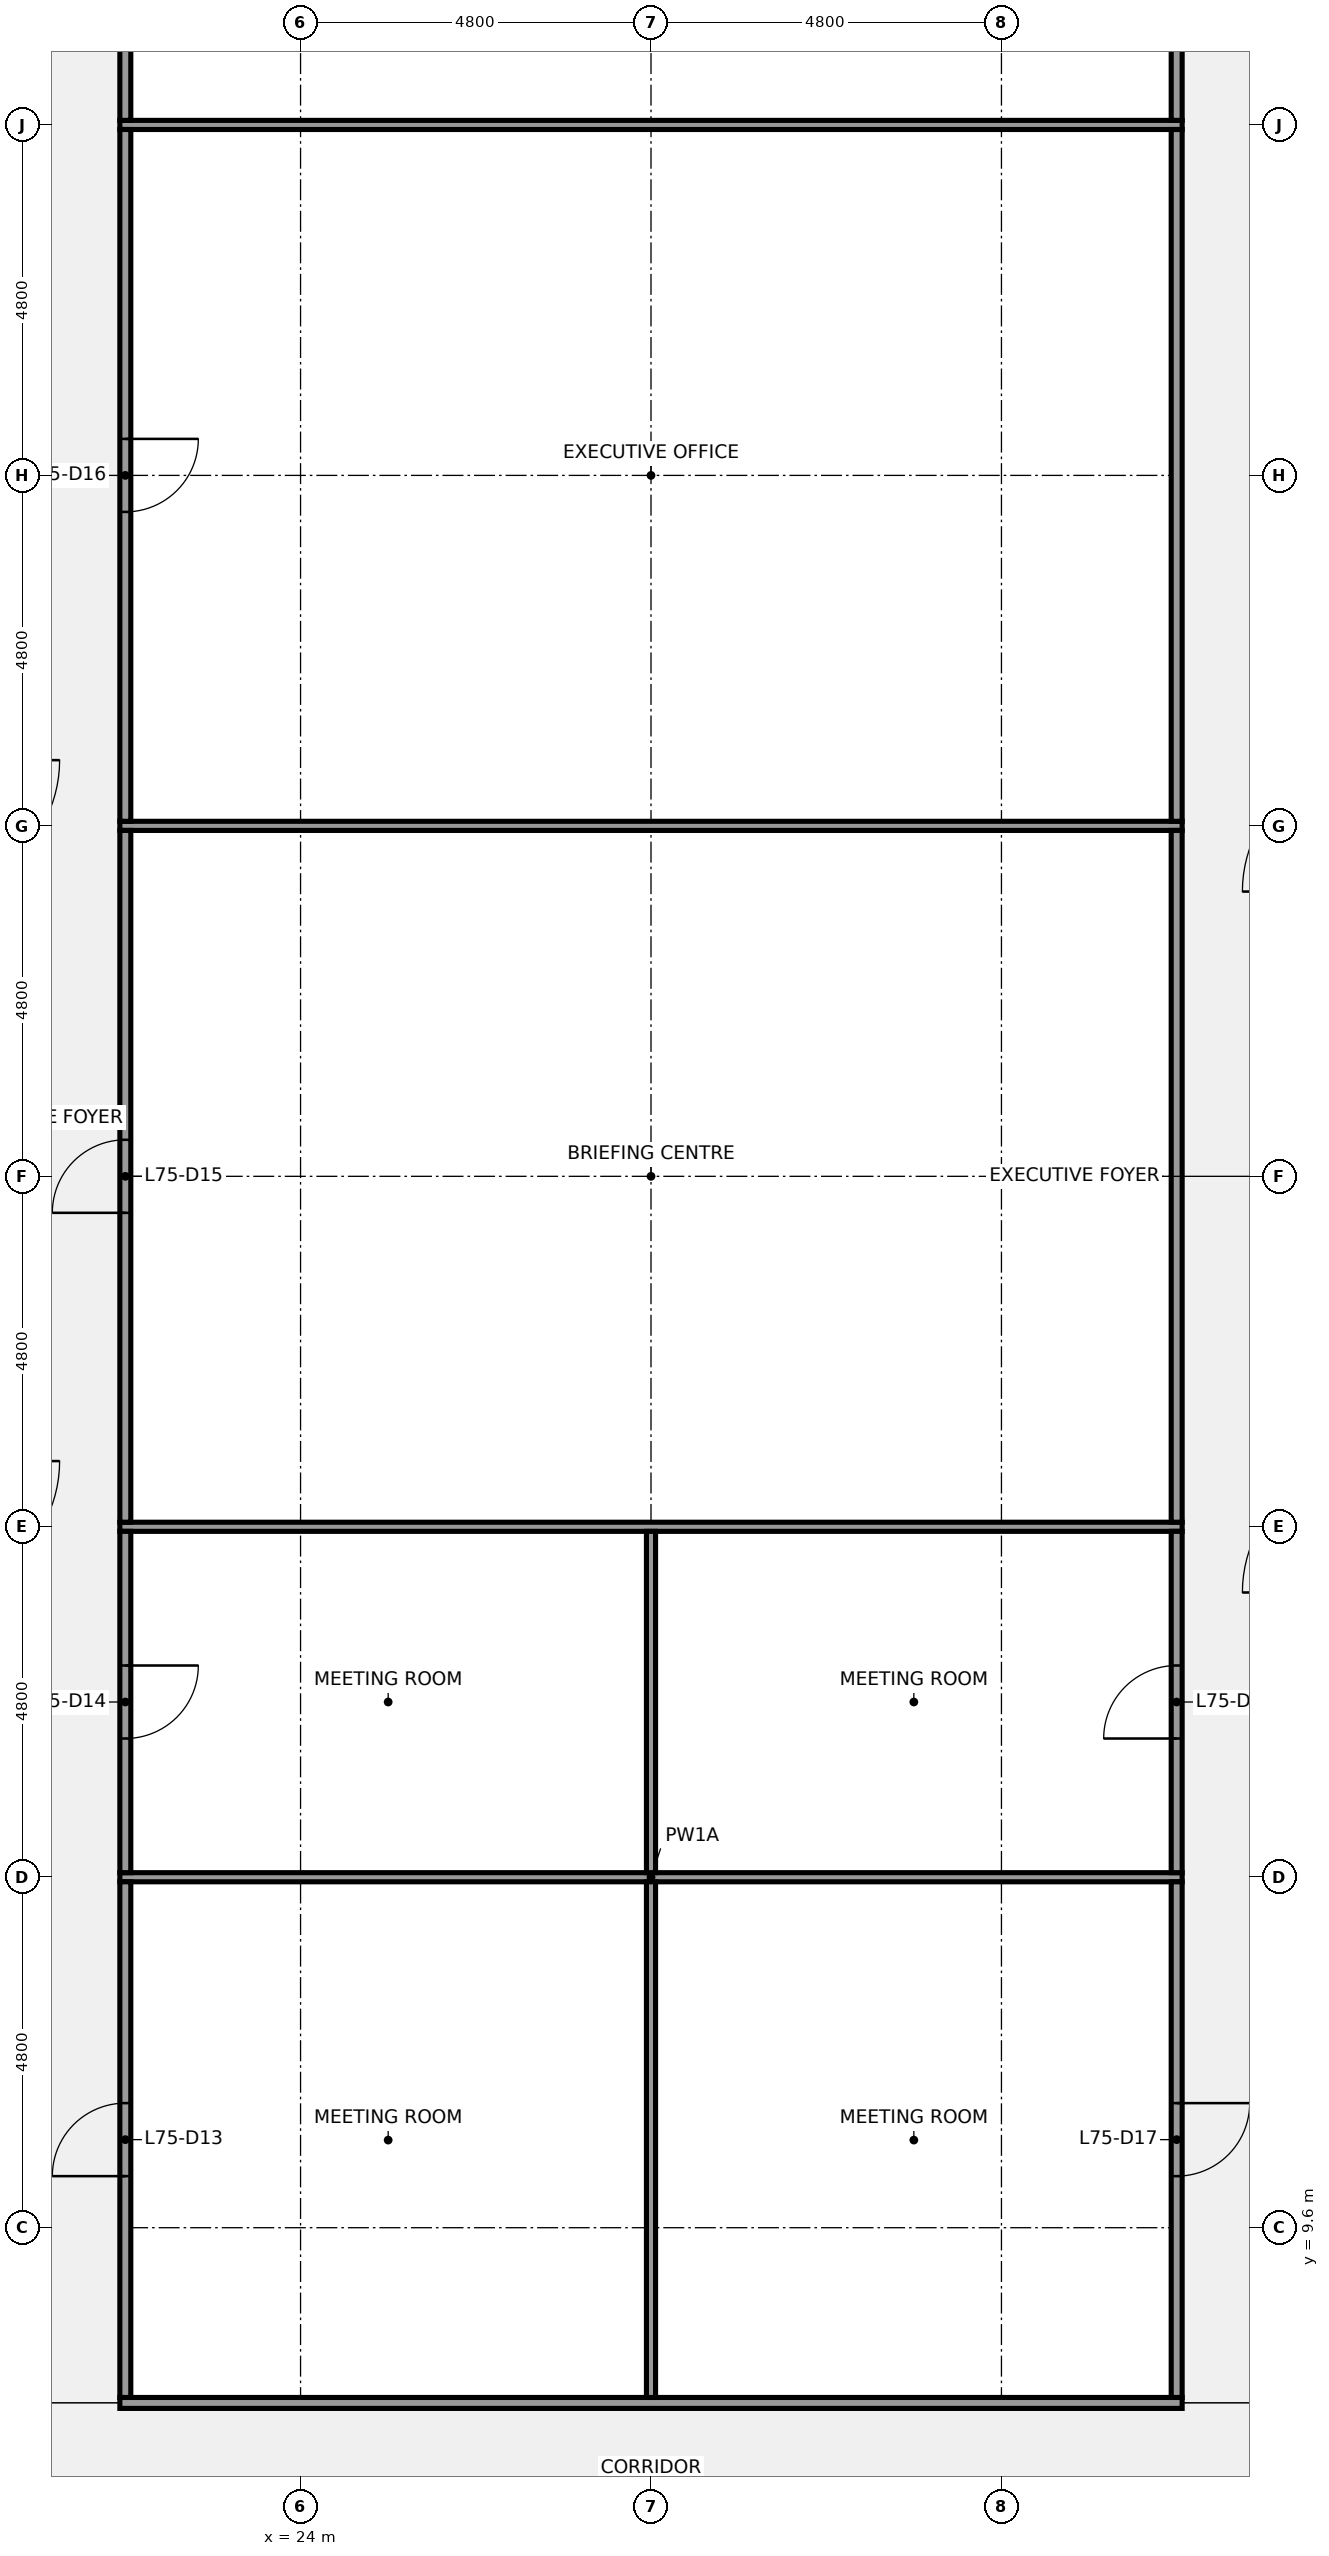
"""IFC4 building model, lengths in metres.
Left out: names, types, materials, properties, quantities, classifications, styles, units other than length and angle.
Written with IfcOpenShell. Run it as: python <this file> out.ifc"""

import sys

from ifc_helpers import new_model, si_unit, direction, frame, frame_2d, origin, place, context, subcontext, project, spatial, rectangle, extrude, element, fill, save


model = new_model("IFC4")
c1 = context("Model", 3, precision=1e-05, world=origin(), true_north=direction((0.0, 1.0)))
c2 = subcontext(c1, "Body", "Model", "MODEL_VIEW")
j1 = project(units=[si_unit("LENGTHUNIT", "METRE"), si_unit("PLANEANGLEUNIT", "RADIAN")], contexts=[c1])
p1 = place(None, origin())
s1 = spatial("IfcSite", under=j1, at=p1, CompositionType="ELEMENT")
p2 = place(p1, origin())
s2 = spatial("IfcBuilding", under=s1, at=p2, CompositionType="ELEMENT")
p3 = place(p2, frame((0.0, 0.0, 338.3)))
s3 = spatial("IfcBuildingStorey", under=s2, at=p3, CompositionType="ELEMENT", Elevation=338.3)
p4 = place(p3, frame((21.525, 7.2, 0.0), z_axis=(0.0, 0.0, 1.0), x_axis=(1.0, 0.0, 0.0)))
e1 = element("IfcWall", 1, at=p4, inside=s3, PredefinedType="PARTITIONING", context=c2, shape_type="SweptSolid", body=[
    extrude(rectangle(XDim=14.55, YDim=0.15, at=frame_2d((7.275, 0.0))), origin(), (0.0, 0.0, 1.0), 2.87),
])
for number, where, z_axis, x_axis in (
    (2, (21.525, 14.4, 0.0), (0.0, 0.0, 1.0), (1.0, 0.0, 0.0)),
    (3, (21.525, 19.2, 0.0), (0.0, 0.0, 1.0), (1.0, 0.0, 0.0)),
    (4, (21.525, 28.8, 0.0), (0.0, 0.0, 1.0), (1.0, 0.0, 0.0)),
    (5, (21.525, 38.4, 0.0), (0.0, 0.0, 1.0), (1.0, 0.0, 0.0)),
):
    element("IfcWall", number, at=place(p3, frame(where, z_axis=z_axis, x_axis=x_axis)), inside=s3, PredefinedType="PARTITIONING", context=c2, shape_type="SweptSolid", body=[
        extrude(rectangle(XDim=14.55, YDim=0.125, at=frame_2d((7.275, 0.0))), origin(), (0.0, 0.0, 1.0), 2.87),
    ])
p5 = place(p3, frame((21.6, 7.275, 0.0), z_axis=(0.0, 0.0, 1.0), x_axis=(0.0, 1.0, 0.0)))
e6 = element("IfcWall", 6, at=p5, inside=s3, PredefinedType="PARTITIONING", context=c2, shape_type="SweptSolid", body=[
    extrude(rectangle(XDim=7.062, YDim=0.15, at=frame_2d((3.531, 0.0))), origin(), (0.0, 0.0, 1.0), 2.87),
])
p6 = place(p5, frame((3.031, 0.0, 0.0)))
e7 = element("IfcOpeningElement", 7, at=p6, cuts=e6, PredefinedType="OPENING", context=c2, shape_type="SweptSolid", body=[
    extrude(rectangle(XDim=1.0, YDim=2.1, at=frame_2d((0.5, 1.05))), frame((0.0, 0.085, 0.0), z_axis=(0.0, -1.0, 0.0), x_axis=(1.0, 0.0, 0.0)), (0.0, 0.0, 1.0), 0.17),
])
p7 = place(p3, frame((21.6, 14.462, 0.0), z_axis=(0.0, 0.0, 1.0), x_axis=(0.0, 1.0, 0.0)))
e8 = element("IfcWall", 8, at=p7, inside=s3, PredefinedType="PARTITIONING", context=c2, shape_type="SweptSolid", body=[
    extrude(rectangle(XDim=4.675, YDim=0.15, at=frame_2d((2.337, 0.0))), origin(), (0.0, 0.0, 1.0), 2.87),
])
p8 = place(p7, frame((1.837, 0.0, 0.0)))
e9 = element("IfcOpeningElement", 9, at=p8, cuts=e8, PredefinedType="OPENING", context=c2, shape_type="SweptSolid", body=[
    extrude(rectangle(XDim=1.0, YDim=2.1, at=frame_2d((0.5, 1.05))), frame((0.0, 0.085, 0.0), z_axis=(0.0, -1.0, 0.0), x_axis=(1.0, 0.0, 0.0)), (0.0, 0.0, 1.0), 0.17),
])
p9 = place(p3, frame((21.6, 19.262, 0.0), z_axis=(0.0, 0.0, 1.0), x_axis=(0.0, 1.0, 0.0)))
e10 = element("IfcWall", 10, at=p9, inside=s3, PredefinedType="PARTITIONING", context=c2, shape_type="SweptSolid", body=[
    extrude(rectangle(XDim=9.475, YDim=0.15, at=frame_2d((4.738, 0.0))), origin(), (0.0, 0.0, 1.0), 2.87),
])
p10 = place(p9, frame((4.238, 0.0, 0.0)))
e11 = element("IfcOpeningElement", 11, at=p10, cuts=e10, PredefinedType="OPENING", context=c2, shape_type="SweptSolid", body=[
    extrude(rectangle(XDim=1.0, YDim=2.1, at=frame_2d((0.5, 1.05))), frame((0.0, 0.085, 0.0), z_axis=(0.0, -1.0, 0.0), x_axis=(1.0, 0.0, 0.0)), (0.0, 0.0, 1.0), 0.17),
])
p11 = place(p3, frame((21.6, 28.863, 0.0), z_axis=(0.0, 0.0, 1.0), x_axis=(0.0, 1.0, 0.0)))
e12 = element("IfcWall", 12, at=p11, inside=s3, PredefinedType="PARTITIONING", context=c2, shape_type="SweptSolid", body=[
    extrude(rectangle(XDim=9.475, YDim=0.15, at=frame_2d((4.737, 0.0))), origin(), (0.0, 0.0, 1.0), 2.87),
])
p12 = place(p11, frame((4.238, 0.0, 0.0)))
e13 = element("IfcOpeningElement", 13, at=p12, cuts=e12, PredefinedType="OPENING", context=c2, shape_type="SweptSolid", body=[
    extrude(rectangle(XDim=1.0, YDim=2.1, at=frame_2d((0.5, 1.05))), frame((0.0, 0.085, 0.0), z_axis=(0.0, -1.0, 0.0), x_axis=(1.0, 0.0, 0.0)), (0.0, 0.0, 1.0), 0.17),
])
p13 = place(p3, frame((21.6, 38.462, 0.0), z_axis=(0.0, 0.0, 1.0), x_axis=(0.0, 1.0, 0.0)))
e14 = element("IfcWall", 14, at=p13, inside=s3, PredefinedType="PARTITIONING", context=c2, shape_type="SweptSolid", body=[
    extrude(rectangle(XDim=2.263, YDim=0.15, at=frame_2d((1.131, 0.0))), origin(), (0.0, 0.0, 1.0), 2.87),
])
p14 = place(p3, frame((28.8, 7.275, 0.0), z_axis=(0.0, 0.0, 1.0), x_axis=(0.0, 1.0, 0.0)))
e15 = element("IfcWall", 15, at=p14, inside=s3, PredefinedType="PARTITIONING", context=c2, shape_type="SweptSolid", body=[
    extrude(rectangle(XDim=7.062, YDim=0.125, at=frame_2d((3.531, 0.0))), origin(), (0.0, 0.0, 1.0), 2.87),
])
p15 = place(p3, frame((28.8, 14.462, 0.0), z_axis=(0.0, 0.0, 1.0), x_axis=(0.0, 1.0, 0.0)))
e16 = element("IfcWall", 16, at=p15, inside=s3, PredefinedType="PARTITIONING", context=c2, shape_type="SweptSolid", body=[
    extrude(rectangle(XDim=4.675, YDim=0.125, at=frame_2d((2.337, 0.0))), origin(), (0.0, 0.0, 1.0), 2.87),
])
p16 = place(p3, frame((36.0, 7.275, 0.0), z_axis=(0.0, 0.0, 1.0), x_axis=(0.0, 1.0, 0.0)))
e17 = element("IfcWall", 17, at=p16, inside=s3, PredefinedType="PARTITIONING", context=c2, shape_type="SweptSolid", body=[
    extrude(rectangle(XDim=7.062, YDim=0.15, at=frame_2d((3.531, 0.0))), origin(), (0.0, 0.0, 1.0), 2.87),
])
p17 = place(p16, frame((3.031, 0.0, 0.0)))
e18 = element("IfcOpeningElement", 18, at=p17, cuts=e17, PredefinedType="OPENING", context=c2, shape_type="SweptSolid", body=[
    extrude(rectangle(XDim=1.0, YDim=2.1, at=frame_2d((0.5, 1.05))), frame((0.0, 0.085, 0.0), z_axis=(0.0, -1.0, 0.0), x_axis=(1.0, 0.0, 0.0)), (0.0, 0.0, 1.0), 0.17),
])
p18 = place(p3, frame((36.0, 14.462, 0.0), z_axis=(0.0, 0.0, 1.0), x_axis=(0.0, 1.0, 0.0)))
e19 = element("IfcWall", 19, at=p18, inside=s3, PredefinedType="PARTITIONING", context=c2, shape_type="SweptSolid", body=[
    extrude(rectangle(XDim=4.675, YDim=0.15, at=frame_2d((2.337, 0.0))), origin(), (0.0, 0.0, 1.0), 2.87),
])
p19 = place(p18, frame((1.837, 0.0, 0.0)))
e20 = element("IfcOpeningElement", 20, at=p19, cuts=e19, PredefinedType="OPENING", context=c2, shape_type="SweptSolid", body=[
    extrude(rectangle(XDim=1.0, YDim=2.1, at=frame_2d((0.5, 1.05))), frame((0.0, 0.085, 0.0), z_axis=(0.0, -1.0, 0.0), x_axis=(1.0, 0.0, 0.0)), (0.0, 0.0, 1.0), 0.17),
])
p20 = place(p3, frame((36.0, 19.262, 0.0), z_axis=(0.0, 0.0, 1.0), x_axis=(0.0, 1.0, 0.0)))
e21 = element("IfcWall", 21, at=p20, inside=s3, PredefinedType="PARTITIONING", context=c2, shape_type="SweptSolid", body=[
    extrude(rectangle(XDim=9.475, YDim=0.15, at=frame_2d((4.738, 0.0))), origin(), (0.0, 0.0, 1.0), 2.87),
])
p21 = place(p3, frame((36.0, 28.863, 0.0), z_axis=(0.0, 0.0, 1.0), x_axis=(0.0, 1.0, 0.0)))
e22 = element("IfcWall", 22, at=p21, inside=s3, PredefinedType="PARTITIONING", context=c2, shape_type="SweptSolid", body=[
    extrude(rectangle(XDim=9.475, YDim=0.15, at=frame_2d((4.737, 0.0))), origin(), (0.0, 0.0, 1.0), 2.87),
])
p22 = place(p3, frame((36.0, 38.462, 0.0), z_axis=(0.0, 0.0, 1.0), x_axis=(0.0, 1.0, 0.0)))
e23 = element("IfcWall", 23, at=p22, inside=s3, PredefinedType="PARTITIONING", context=c2, shape_type="SweptSolid", body=[
    extrude(rectangle(XDim=2.263, YDim=0.15, at=frame_2d((1.131, 0.0))), origin(), (0.0, 0.0, 1.0), 2.87),
])
p23 = place(p6, origin())
e24 = element("IfcDoor", 24, at=p23, inside=s3, OperationType="SINGLE_SWING_LEFT", PredefinedType="DOOR", context=c2, shape_type="SweptSolid", body=[
    extrude(rectangle(XDim=1.0, YDim=2.1, at=frame_2d((0.5, 1.05))), frame((0.0, 0.025, 0.0), z_axis=(0.0, -1.0, 0.0), x_axis=(1.0, 0.0, 0.0)), (0.0, 0.0, 1.0), 0.05),
])
fill(e7, e24)
p24 = place(p8, origin())
e25 = element("IfcDoor", 25, at=p24, inside=s3, OperationType="SINGLE_SWING_RIGHT", PredefinedType="DOOR", context=c2, shape_type="SweptSolid", body=[
    extrude(rectangle(XDim=1.0, YDim=2.1, at=frame_2d((0.5, 1.05))), frame((0.0, 0.025, 0.0), z_axis=(0.0, -1.0, 0.0), x_axis=(1.0, 0.0, 0.0)), (0.0, 0.0, 1.0), 0.05),
])
fill(e9, e25)
p25 = place(p10, origin())
e26 = element("IfcDoor", 26, at=p25, inside=s3, OperationType="SINGLE_SWING_LEFT", PredefinedType="DOOR", context=c2, shape_type="SweptSolid", body=[
    extrude(rectangle(XDim=1.0, YDim=2.1, at=frame_2d((0.5, 1.05))), frame((0.0, 0.025, 0.0), z_axis=(0.0, -1.0, 0.0), x_axis=(1.0, 0.0, 0.0)), (0.0, 0.0, 1.0), 0.05),
])
fill(e11, e26)
p26 = place(p12, origin())
e27 = element("IfcDoor", 27, at=p26, inside=s3, OperationType="SINGLE_SWING_RIGHT", PredefinedType="DOOR", context=c2, shape_type="SweptSolid", body=[
    extrude(rectangle(XDim=1.0, YDim=2.1, at=frame_2d((0.5, 1.05))), frame((0.0, 0.025, 0.0), z_axis=(0.0, -1.0, 0.0), x_axis=(1.0, 0.0, 0.0)), (0.0, 0.0, 1.0), 0.05),
])
fill(e13, e27)
p27 = place(p17, origin())
e28 = element("IfcDoor", 28, at=p27, inside=s3, OperationType="SINGLE_SWING_RIGHT", PredefinedType="DOOR", context=c2, shape_type="SweptSolid", body=[
    extrude(rectangle(XDim=1.0, YDim=2.1, at=frame_2d((0.5, 1.05))), frame((0.0, 0.025, 0.0), z_axis=(0.0, -1.0, 0.0), x_axis=(1.0, 0.0, 0.0)), (0.0, 0.0, 1.0), 0.05),
])
fill(e18, e28)
p28 = place(p19, origin())
e29 = element("IfcDoor", 29, at=p28, inside=s3, OperationType="SINGLE_SWING_LEFT", PredefinedType="DOOR", context=c2, shape_type="SweptSolid", body=[
    extrude(rectangle(XDim=1.0, YDim=2.1, at=frame_2d((0.5, 1.05))), frame((0.0, 0.025, 0.0), z_axis=(0.0, -1.0, 0.0), x_axis=(1.0, 0.0, 0.0)), (0.0, 0.0, 1.0), 0.05),
])
fill(e20, e29)
save(model, sys.argv[1])
